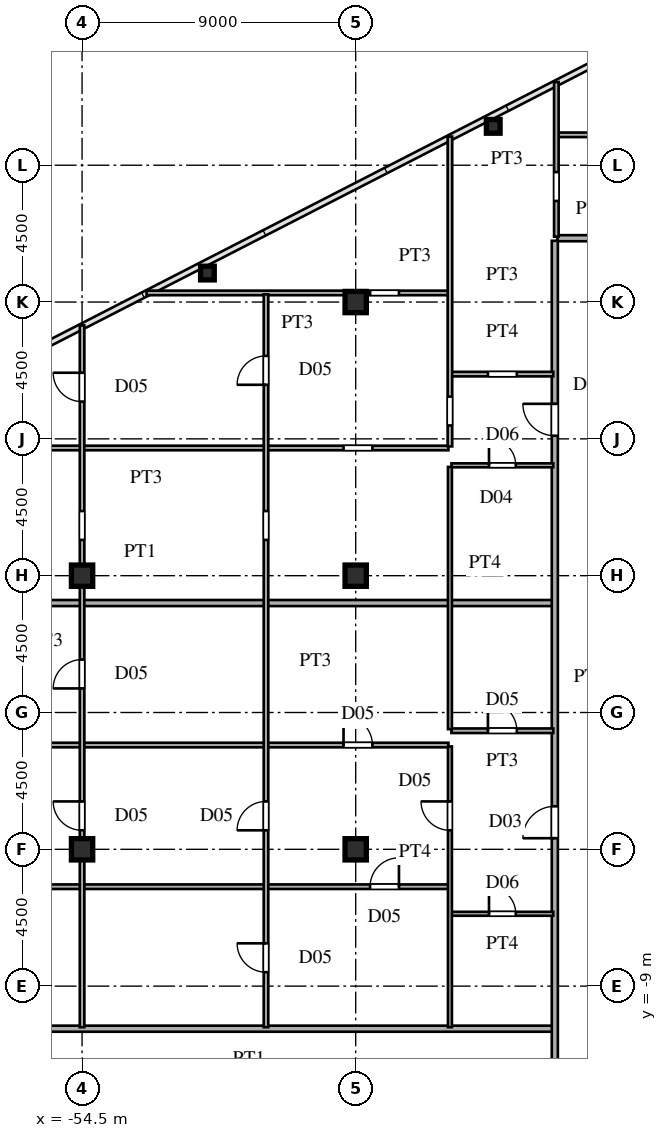
"""IFC4 building model, lengths in metres.
Left out: names, types, materials, properties, quantities, classifications, styles, units other than length and angle.
Written with IfcOpenShell. Run it as: python <this file> out.ifc"""

import sys

from ifc_helpers import new_model, si_unit, direction, frame, frame_2d, origin, origin_2d, place, context, subcontext, project, spatial, rectangle, hollow_rectangle, i_section, extrude, source, transform, mapped, element, fill, save


model = new_model("IFC4")
c1 = context("Model", 3, precision=1e-05, world=origin(), true_north=direction((0.0, 1.0)))
c2 = subcontext(c1, "Body", "Model", "MODEL_VIEW")
j1 = project(units=[si_unit("LENGTHUNIT", "METRE"), si_unit("PLANEANGLEUNIT", "RADIAN")], contexts=[c1])
p1 = place(None, origin())
s1 = spatial("IfcSite", under=j1, at=p1, CompositionType="ELEMENT")
p2 = place(p1, origin())
s2 = spatial("IfcBuilding", under=s1, at=p2, CompositionType="ELEMENT")
p3 = place(p2, frame((0.0, 0.0, 124.8)))
s3 = spatial("IfcBuildingStorey", under=s2, at=p3, CompositionType="ELEMENT", Elevation=124.8)
m1 = source(origin(), c2, "Body", "SweptSolid", [
    extrude(i_section(OverallWidth=0.7, OverallDepth=0.7, WebThickness=0.028, FlangeThickness=0.045, at=origin_2d()), origin(), (0.0, 0.0, 1.0), 3.6),
])
for number, where, z_axis, x_axis in (
    (1, (-45.5, -4.5, 0.0), (0.0, 0.0, 1.0), (1.0, 0.0, 0.0)),
    (2, (-45.5, 4.5, 0.0), (0.0, 0.0, 1.0), (1.0, 0.0, 0.0)),
    (3, (-45.5, 13.5, 0.0), (0.0, 0.0, 1.0), (1.0, 0.0, 0.0)),
    (4, (-54.5, -4.5, 0.0), (0.0, 0.0, 1.0), (1.0, 0.0, 0.0)),
    (5, (-54.5, 4.5, 0.0), (0.0, 0.0, 1.0), (1.0, 0.0, 0.0)),
):
    element("IfcColumn", number, at=place(p3, frame(where, z_axis=z_axis, x_axis=x_axis)), inside=s3, PredefinedType="COLUMN", context=c2, shape_type="MappedRepresentation", body=[
        mapped(m1, transform((0.0, 0.0, 0.0), scale=1.0)),
    ])
m2 = source(origin(), c2, "Body", "SweptSolid", [
    extrude(hollow_rectangle(XDim=0.45, YDim=0.45, WallThickness=0.018, at=origin_2d()), origin(), (0.0, 0.0, 1.0), 3.6),
])
for number, where, z_axis, x_axis in (
    (6, (-40.976, 19.278, 0.0), (0.0, 0.0, 1.0), (1.0, 0.0, 0.0)),
    (7, (-50.377, 14.453, 0.0), (0.0, 0.0, 1.0), (1.0, 0.0, 0.0)),
):
    element("IfcColumn", number, at=place(p3, frame(where, z_axis=z_axis, x_axis=x_axis)), inside=s3, PredefinedType="COLUMN", context=c2, shape_type="MappedRepresentation", body=[
        mapped(m2, transform((0.0, 0.0, 0.0), scale=1.0)),
    ])
p4 = place(p3, frame((-58.988, -10.4, 0.0), z_axis=(0.0, 0.0, 1.0), x_axis=(1.0, 0.0, 0.0)))
e8 = element("IfcWall", 8, at=p4, inside=s3, PredefinedType="PARTITIONING", context=c2, shape_type="SweptSolid", body=[
    extrude(rectangle(XDim=19.958, YDim=0.2, at=frame_2d((9.979, 0.0))), origin(), (0.0, 0.0, 1.0), 3.38),
])
p5 = place(p3, frame((-42.35, -6.62, 0.0), z_axis=(0.0, 0.0, 1.0), x_axis=(1.0, 0.0, 0.0)))
e9 = element("IfcWall", 9, at=p5, inside=s3, PredefinedType="PARTITIONING", context=c2, shape_type="SweptSolid", body=[
    extrude(rectangle(XDim=3.35, YDim=0.13, at=frame_2d((1.675, 0.0))), origin(), (0.0, 0.0, 1.0), 3.38),
])
p6 = place(p5, frame((1.235, 0.0, 0.0)))
e10 = element("IfcOpeningElement", 10, at=p6, cuts=e9, PredefinedType="OPENING", context=c2, shape_type="SweptSolid", body=[
    extrude(rectangle(XDim=0.88, YDim=2.1, at=frame_2d((0.44, 1.05))), frame((0.0, 0.075, 0.0), z_axis=(0.0, -1.0, 0.0), x_axis=(1.0, 0.0, 0.0)), (0.0, 0.0, 1.0), 0.15),
])
p7 = place(p3, frame((-68.106, -5.73, 0.0), z_axis=(0.0, 0.0, 1.0), x_axis=(1.0, 0.0, 0.0)))
e11 = element("IfcWall", 11, at=p7, inside=s3, PredefinedType="PARTITIONING", context=c2, shape_type="SweptSolid", body=[
    extrude(rectangle(XDim=25.656, YDim=0.15, at=frame_2d((12.828, 0.0))), origin(), (0.0, 0.0, 1.0), 3.38),
])
p8 = place(p7, frame((23.079, 0.0, 0.0)))
e12 = element("IfcOpeningElement", 12, at=p8, cuts=e11, PredefinedType="OPENING", context=c2, shape_type="SweptSolid", body=[
    extrude(rectangle(XDim=0.95, YDim=2.15, at=frame_2d((0.475, 1.075))), frame((0.0, 0.085, 0.0), z_axis=(0.0, -1.0, 0.0), x_axis=(1.0, 0.0, 0.0)), (0.0, 0.0, 1.0), 0.17),
])
p9 = place(p7, frame((10.281, 0.0, 0.0)))
e13 = element("IfcOpeningElement", 13, at=p9, cuts=e11, PredefinedType="OPENING", context=c2, shape_type="SweptSolid", body=[
    extrude(rectangle(XDim=0.95, YDim=2.15, at=frame_2d((0.475, 1.075))), frame((0.0, 0.085, 0.0), z_axis=(0.0, -1.0, 0.0), x_axis=(1.0, 0.0, 0.0)), (0.0, 0.0, 1.0), 0.17),
])
p10 = place(p3, frame((-69.535, -1.07, 0.0), z_axis=(0.0, 0.0, 1.0), x_axis=(1.0, 0.0, 0.0)))
e14 = element("IfcWall", 14, at=p10, inside=s3, PredefinedType="PARTITIONING", context=c2, shape_type="SweptSolid", body=[
    extrude(rectangle(XDim=27.085, YDim=0.15, at=frame_2d((13.542, 0.0))), origin(), (0.0, 0.0, 1.0), 3.38),
])
p11 = place(p10, frame((23.635, 0.0, 0.0)))
e15 = element("IfcOpeningElement", 15, at=p11, cuts=e14, PredefinedType="OPENING", context=c2, shape_type="SweptSolid", body=[
    extrude(rectangle(XDim=0.95, YDim=2.15, at=frame_2d((0.475, 1.075))), frame((0.0, 0.085, 0.0), z_axis=(0.0, -1.0, 0.0), x_axis=(1.0, 0.0, 0.0)), (0.0, 0.0, 1.0), 0.17),
])
p12 = place(p10, frame((11.71, 0.0, 0.0)))
e16 = element("IfcOpeningElement", 16, at=p12, cuts=e14, PredefinedType="OPENING", context=c2, shape_type="SweptSolid", body=[
    extrude(rectangle(XDim=0.95, YDim=2.15, at=frame_2d((0.475, 1.075))), frame((0.0, 0.085, 0.0), z_axis=(0.0, -1.0, 0.0), x_axis=(1.0, 0.0, 0.0)), (0.0, 0.0, 1.0), 0.17),
])
p13 = place(p3, frame((-42.35, -0.6, 0.0), z_axis=(0.0, 0.0, 1.0), x_axis=(1.0, 0.0, 0.0)))
e17 = element("IfcWall", 17, at=p13, inside=s3, PredefinedType="PARTITIONING", context=c2, shape_type="SweptSolid", body=[
    extrude(rectangle(XDim=3.35, YDim=0.15, at=frame_2d((1.675, 0.0))), origin(), (0.0, 0.0, 1.0), 3.38),
])
p14 = place(p13, frame((1.2, 0.0, 0.0)))
e18 = element("IfcOpeningElement", 18, at=p14, cuts=e17, PredefinedType="OPENING", context=c2, shape_type="SweptSolid", body=[
    extrude(rectangle(XDim=0.95, YDim=2.15, at=frame_2d((0.475, 1.075))), frame((0.0, 0.085, 0.0), z_axis=(0.0, -1.0, 0.0), x_axis=(1.0, 0.0, 0.0)), (0.0, 0.0, 1.0), 0.17),
])
p15 = place(p3, frame((-69.505, 3.6, 0.0), z_axis=(0.0, 0.0, 1.0), x_axis=(1.0, 0.0, 0.0)))
e19 = element("IfcWall", 19, at=p15, inside=s3, PredefinedType="PARTITIONING", context=c2, shape_type="SweptSolid", body=[
    extrude(rectangle(XDim=30.475, YDim=0.2, at=frame_2d((15.237, 0.0))), origin(), (0.0, 0.0, 1.0), 3.38),
])
p16 = place(p3, frame((-42.35, 8.13, 0.0), z_axis=(0.0, 0.0, 1.0), x_axis=(1.0, 0.0, 0.0)))
e20 = element("IfcWall", 20, at=p16, inside=s3, PredefinedType="PARTITIONING", context=c2, shape_type="SweptSolid", body=[
    extrude(rectangle(XDim=3.35, YDim=0.13, at=frame_2d((1.675, 0.0))), origin(), (0.0, 0.0, 1.0), 3.38),
])
p17 = place(p16, frame((1.235, 0.0, 0.0)))
e21 = element("IfcOpeningElement", 21, at=p17, cuts=e20, PredefinedType="OPENING", context=c2, shape_type="SweptSolid", body=[
    extrude(rectangle(XDim=0.88, YDim=2.1, at=frame_2d((0.44, 1.05))), frame((0.0, 0.075, 0.0), z_axis=(0.0, -1.0, 0.0), x_axis=(1.0, 0.0, 0.0)), (0.0, 0.0, 1.0), 0.15),
])
p18 = place(p3, frame((-62.321, 8.7, 0.0), z_axis=(0.0, 0.0, 1.0), x_axis=(1.0, 0.0, 0.0)))
e22 = element("IfcWall", 22, at=p18, inside=s3, PredefinedType="PARTITIONING", context=c2, shape_type="SweptSolid", body=[
    extrude(rectangle(XDim=19.871, YDim=0.15, at=frame_2d((9.936, 0.0))), origin(), (0.0, 0.0, 1.0), 3.38),
])
p19 = place(p18, frame((16.421, 0.0, 0.0)))
e23 = element("IfcOpeningElement", 23, at=p19, cuts=e22, PredefinedType="OPENING", context=c2, shape_type="SweptSolid", body=[
    extrude(rectangle(XDim=0.95, YDim=2.15, at=frame_2d((0.475, 1.075))), frame((0.0, 0.085, 0.0), z_axis=(0.0, -1.0, 0.0), x_axis=(1.0, 0.0, 0.0)), (0.0, 0.0, 1.0), 0.17),
])
p20 = place(p3, frame((-42.35, 11.13, 0.0), z_axis=(0.0, 0.0, 1.0), x_axis=(1.0, 0.0, 0.0)))
e24 = element("IfcWall", 24, at=p20, inside=s3, PredefinedType="PARTITIONING", context=c2, shape_type="SweptSolid", body=[
    extrude(rectangle(XDim=3.35, YDim=0.15, at=frame_2d((1.675, 0.0))), origin(), (0.0, 0.0, 1.0), 3.38),
])
p21 = place(p20, frame((1.2, 0.0, 0.0)))
e25 = element("IfcOpeningElement", 25, at=p21, cuts=e24, PredefinedType="OPENING", context=c2, shape_type="SweptSolid", body=[
    extrude(rectangle(XDim=0.95, YDim=2.15, at=frame_2d((0.475, 1.075))), frame((0.0, 0.085, 0.0), z_axis=(0.0, -1.0, 0.0), x_axis=(1.0, 0.0, 0.0)), (0.0, 0.0, 1.0), 0.17),
])
p22 = place(p3, frame((-52.378, 13.8, 0.0), z_axis=(0.0, 0.0, 1.0), x_axis=(1.0, 0.0, 0.0)))
e26 = element("IfcWall", 26, at=p22, inside=s3, PredefinedType="PARTITIONING", context=c2, shape_type="SweptSolid", body=[
    extrude(rectangle(XDim=9.928, YDim=0.15, at=frame_2d((4.964, 0.0))), origin(), (0.0, 0.0, 1.0), 2.78),
])
p23 = place(p22, frame((7.351, 0.0, 0.0)))
e27 = element("IfcOpeningElement", 27, at=p23, cuts=e26, PredefinedType="OPENING", context=c2, shape_type="SweptSolid", body=[
    extrude(rectangle(XDim=0.95, YDim=2.15, at=frame_2d((0.475, 1.075))), frame((0.0, 0.085, 0.0), z_axis=(0.0, -1.0, 0.0), x_axis=(1.0, 0.0, 0.0)), (0.0, 0.0, 1.0), 0.17),
])
p24 = place(p3, frame((-38.865, 15.6, 0.0), z_axis=(0.0, 0.0, 1.0), x_axis=(1.0, 0.0, 0.0)))
e28 = element("IfcWall", 28, at=p24, inside=s3, PredefinedType="PARTITIONING", context=c2, shape_type="SweptSolid", body=[
    extrude(rectangle(XDim=2.28, YDim=0.2, at=frame_2d((1.14, 0.0))), origin(), (0.0, 0.0, 1.0), 3.38),
])
p25 = place(p3, frame((-38.85, 19.0, 0.0), z_axis=(0.0, 0.0, 1.0), x_axis=(1.0, 0.0, 0.0)))
e29 = element("IfcWall", 29, at=p25, inside=s3, PredefinedType="PARTITIONING", context=c2, shape_type="SweptSolid", body=[
    extrude(rectangle(XDim=11.385, YDim=0.15, at=frame_2d((5.692, 0.0))), origin(), (0.0, 0.0, 1.0), 3.38),
])
p26 = place(p25, frame((5.175, 0.0, 0.0)))
e30 = element("IfcOpeningElement", 30, at=p26, cuts=e29, PredefinedType="OPENING", context=c2, shape_type="SweptSolid", body=[
    extrude(rectangle(XDim=0.95, YDim=2.15, at=frame_2d((0.475, 1.075))), frame((0.0, 0.085, 0.0), z_axis=(0.0, -1.0, 0.0), x_axis=(1.0, 0.0, 0.0)), (0.0, 0.0, 1.0), 0.17),
])
p27 = place(p3, frame((-54.5, -10.35, 0.0), z_axis=(0.0, 0.0, 1.0), x_axis=(0.0, 1.0, 0.0)))
e31 = element("IfcWall", 31, at=p27, inside=s3, PredefinedType="PARTITIONING", context=c2, shape_type="SweptSolid", body=[
    extrude(rectangle(XDim=23.082, YDim=0.15, at=frame_2d((11.541, 0.0))), origin(), (0.0, 0.0, 1.0), 2.78),
])
p28 = place(p27, frame((6.475, 0.0, 0.0)))
e32 = element("IfcOpeningElement", 32, at=p28, cuts=e31, PredefinedType="OPENING", context=c2, shape_type="SweptSolid", body=[
    extrude(rectangle(XDim=0.95, YDim=2.15, at=frame_2d((0.475, 1.075))), frame((0.0, 0.085, 0.0), z_axis=(0.0, -1.0, 0.0), x_axis=(1.0, 0.0, 0.0)), (0.0, 0.0, 1.0), 0.17),
])
p29 = place(p27, frame((11.142, 0.0, 0.0)))
e33 = element("IfcOpeningElement", 33, at=p29, cuts=e31, PredefinedType="OPENING", context=c2, shape_type="SweptSolid", body=[
    extrude(rectangle(XDim=0.95, YDim=2.15, at=frame_2d((0.475, 1.075))), frame((0.0, 0.085, 0.0), z_axis=(0.0, -1.0, 0.0), x_axis=(1.0, 0.0, 0.0)), (0.0, 0.0, 1.0), 0.17),
])
p30 = place(p27, frame((20.575, 0.0, 0.0)))
e34 = element("IfcOpeningElement", 34, at=p30, cuts=e31, PredefinedType="OPENING", context=c2, shape_type="SweptSolid", body=[
    extrude(rectangle(XDim=0.95, YDim=2.15, at=frame_2d((0.475, 1.075))), frame((0.0, 0.085, 0.0), z_axis=(0.0, -1.0, 0.0), x_axis=(1.0, 0.0, 0.0)), (0.0, 0.0, 1.0), 0.17),
])
p31 = place(p27, frame((16.026, 0.0, 0.0)))
e35 = element("IfcOpeningElement", 35, at=p31, cuts=e31, PredefinedType="OPENING", context=c2, shape_type="SweptSolid", body=[
    extrude(rectangle(XDim=0.95, YDim=2.15, at=frame_2d((0.475, 1.075))), frame((0.0, 0.085, 0.0), z_axis=(0.0, -1.0, 0.0), x_axis=(1.0, 0.0, 0.0)), (0.0, 0.0, 1.0), 0.17),
])
p32 = place(p3, frame((-48.45, -10.35, 0.0), z_axis=(0.0, 0.0, 1.0), x_axis=(0.0, 1.0, 0.0)))
e36 = element("IfcWall", 36, at=p32, inside=s3, PredefinedType="PARTITIONING", context=c2, shape_type="SweptSolid", body=[
    extrude(rectangle(XDim=24.104, YDim=0.15, at=frame_2d((12.052, 0.0))), origin(), (0.0, 0.0, 1.0), 3.38),
])
p33 = place(p32, frame((6.475, 0.0, 0.0)))
e37 = element("IfcOpeningElement", 37, at=p33, cuts=e36, PredefinedType="OPENING", context=c2, shape_type="SweptSolid", body=[
    extrude(rectangle(XDim=0.95, YDim=2.15, at=frame_2d((0.475, 1.075))), frame((0.0, 0.085, 0.0), z_axis=(0.0, -1.0, 0.0), x_axis=(1.0, 0.0, 0.0)), (0.0, 0.0, 1.0), 0.17),
])
p34 = place(p32, frame((1.808, 0.0, 0.0)))
e38 = element("IfcOpeningElement", 38, at=p34, cuts=e36, PredefinedType="OPENING", context=c2, shape_type="SweptSolid", body=[
    extrude(rectangle(XDim=0.95, YDim=2.15, at=frame_2d((0.475, 1.075))), frame((0.0, 0.085, 0.0), z_axis=(0.0, -1.0, 0.0), x_axis=(1.0, 0.0, 0.0)), (0.0, 0.0, 1.0), 0.17),
])
p35 = place(p32, frame((21.128, 0.0, 0.0)))
e39 = element("IfcOpeningElement", 39, at=p35, cuts=e36, PredefinedType="OPENING", context=c2, shape_type="SweptSolid", body=[
    extrude(rectangle(XDim=0.95, YDim=2.15, at=frame_2d((0.475, 1.075))), frame((0.0, 0.085, 0.0), z_axis=(0.0, -1.0, 0.0), x_axis=(1.0, 0.0, 0.0)), (0.0, 0.0, 1.0), 0.17),
])
p36 = place(p32, frame((16.026, 0.0, 0.0)))
e40 = element("IfcOpeningElement", 40, at=p36, cuts=e36, PredefinedType="OPENING", context=c2, shape_type="SweptSolid", body=[
    extrude(rectangle(XDim=0.95, YDim=2.15, at=frame_2d((0.475, 1.075))), frame((0.0, 0.085, 0.0), z_axis=(0.0, -1.0, 0.0), x_axis=(1.0, 0.0, 0.0)), (0.0, 0.0, 1.0), 0.17),
])
p37 = place(p3, frame((-42.4, -10.35, 0.0), z_axis=(0.0, 0.0, 1.0), x_axis=(0.0, 1.0, 0.0)))
e41 = element("IfcWall", 41, at=p37, inside=s3, PredefinedType="PARTITIONING", context=c2, shape_type="SweptSolid", body=[
    extrude(rectangle(XDim=9.233, YDim=0.13, at=frame_2d((4.617, 0.0))), origin(), (0.0, 0.0, 1.0), 3.38),
])
p38 = place(p37, frame((6.475, 0.0, 0.0)))
e42 = element("IfcOpeningElement", 42, at=p38, cuts=e41, PredefinedType="OPENING", context=c2, shape_type="SweptSolid", body=[
    extrude(rectangle(XDim=0.95, YDim=2.15, at=frame_2d((0.475, 1.075))), frame((0.0, 0.075, 0.0), z_axis=(0.0, -1.0, 0.0), x_axis=(1.0, 0.0, 0.0)), (0.0, 0.0, 1.0), 0.15),
])
p39 = place(p3, frame((-42.4, -0.548, 0.0), z_axis=(0.0, 0.0, 1.0), x_axis=(0.0, 1.0, 0.0)))
e43 = element("IfcWall", 43, at=p39, inside=s3, PredefinedType="PARTITIONING", context=c2, shape_type="SweptSolid", body=[
    extrude(rectangle(XDim=8.625, YDim=0.13, at=frame_2d((4.312, 0.0))), origin(), (0.0, 0.0, 1.0), 3.38),
])
p40 = place(p3, frame((-42.4, 8.752, 0.0), z_axis=(0.0, 0.0, 1.0), x_axis=(0.0, 1.0, 0.0)))
e44 = element("IfcWall", 44, at=p40, inside=s3, PredefinedType="PARTITIONING", context=c2, shape_type="SweptSolid", body=[
    extrude(rectangle(XDim=10.19, YDim=0.15, at=frame_2d((5.095, 0.0))), origin(), (0.0, 0.0, 1.0), 3.38),
])
p41 = place(p40, frame((0.688, 0.0, 0.0)))
e45 = element("IfcOpeningElement", 45, at=p41, cuts=e44, PredefinedType="OPENING", context=c2, shape_type="SweptSolid", body=[
    extrude(rectangle(XDim=0.95, YDim=2.15, at=frame_2d((0.475, 1.075))), frame((0.0, 0.085, 0.0), z_axis=(0.0, -1.0, 0.0), x_axis=(1.0, 0.0, 0.0)), (0.0, 0.0, 1.0), 0.17),
])
p42 = place(p3, frame((-38.95, -15.515, 0.0), z_axis=(0.0, 0.0, 1.0), x_axis=(0.0, 1.0, 0.0)))
e46 = element("IfcWall", 46, at=p42, inside=s3, PredefinedType="PARTITIONING", context=c2, shape_type="SweptSolid", body=[
    extrude(rectangle(XDim=31.03, YDim=0.2, at=frame_2d((15.515, 0.0))), origin(), (0.0, 0.0, 1.0), 3.38),
])
p43 = place(p42, frame((1.99, 0.0, 0.0)))
e47 = element("IfcOpeningElement", 47, at=p43, cuts=e46, PredefinedType="OPENING", context=c2, shape_type="SweptSolid", body=[
    extrude(rectangle(XDim=1.05, YDim=2.25, at=frame_2d((0.525, 1.125))), frame((0.0, 0.11, 0.0), z_axis=(0.0, -1.0, 0.0), x_axis=(1.0, 0.0, 0.0)), (0.0, 0.0, 1.0), 0.22),
])
p44 = place(p42, frame((11.38, 0.0, 0.0)))
e48 = element("IfcOpeningElement", 48, at=p44, cuts=e46, PredefinedType="OPENING", context=c2, shape_type="SweptSolid", body=[
    extrude(rectangle(XDim=1.05, YDim=2.25, at=frame_2d((0.525, 1.125))), frame((0.0, 0.11, 0.0), z_axis=(0.0, -1.0, 0.0), x_axis=(1.0, 0.0, 0.0)), (0.0, 0.0, 1.0), 0.22),
])
p45 = place(p42, frame((24.617, 0.0, 0.0)))
e49 = element("IfcOpeningElement", 49, at=p45, cuts=e46, PredefinedType="OPENING", context=c2, shape_type="SweptSolid", body=[
    extrude(rectangle(XDim=1.05, YDim=2.25, at=frame_2d((0.525, 1.125))), frame((0.0, 0.11, 0.0), z_axis=(0.0, -1.0, 0.0), x_axis=(1.0, 0.0, 0.0)), (0.0, 0.0, 1.0), 0.22),
])
p46 = place(p3, frame((-38.9, 15.65, 0.0), z_axis=(0.0, 0.0, 1.0), x_axis=(0.0, 1.0, 0.0)))
e50 = element("IfcWall", 50, at=p46, inside=s3, PredefinedType="PARTITIONING", context=c2, shape_type="SweptSolid", body=[
    extrude(rectangle(XDim=5.088, YDim=0.15, at=frame_2d((2.544, 0.0))), origin(), (0.0, 0.0, 1.0), 3.38),
])
p47 = place(p46, frame((1.175, 0.0, 0.0)))
e51 = element("IfcOpeningElement", 51, at=p47, cuts=e50, PredefinedType="OPENING", context=c2, shape_type="SweptSolid", body=[
    extrude(rectangle(XDim=0.95, YDim=2.15, at=frame_2d((0.475, 1.075))), frame((0.0, 0.085, 0.0), z_axis=(0.0, -1.0, 0.0), x_axis=(1.0, 0.0, 0.0)), (0.0, 0.0, 1.0), 0.17),
])
m3 = source(origin(), c2, "Body", "SweptSolid", [
    extrude(rectangle(XDim=0.88, YDim=2.1, at=frame_2d((0.44, 1.05))), frame((0.0, 0.025, 0.0), z_axis=(0.0, -1.0, 0.0), x_axis=(1.0, 0.0, 0.0)), (0.0, 0.0, 1.0), 0.05),
])
p48 = place(p6, origin())
e52 = element("IfcDoor", 52, at=p48, inside=s3, OperationType="SINGLE_SWING_LEFT", PredefinedType="DOOR", context=c2, shape_type="MappedRepresentation", body=[
    mapped(m3, transform((0.0, 0.0, 0.0), scale=1.0)),
])
fill(e10, e52)
m4 = source(origin(), c2, "Body", "SweptSolid", [
    extrude(rectangle(XDim=0.95, YDim=2.15, at=frame_2d((0.475, 1.075))), frame((0.0, 0.025, 0.0), z_axis=(0.0, -1.0, 0.0), x_axis=(1.0, 0.0, 0.0)), (0.0, 0.0, 1.0), 0.05),
])
p49 = place(p8, origin())
e53 = element("IfcDoor", 53, at=p49, inside=s3, OperationType="SINGLE_SWING_RIGHT", PredefinedType="DOOR", context=c2, shape_type="MappedRepresentation", body=[
    mapped(m4, transform((0.0, 0.0, 0.0), scale=1.0)),
])
fill(e12, e53)
p50 = place(p11, origin())
e54 = element("IfcDoor", 54, at=p50, inside=s3, OperationType="SINGLE_SWING_LEFT", PredefinedType="DOOR", context=c2, shape_type="MappedRepresentation", body=[
    mapped(m4, transform((0.0, 0.0, 0.0), scale=1.0)),
])
fill(e15, e54)
p51 = place(p14, origin())
e55 = element("IfcDoor", 55, at=p51, inside=s3, OperationType="SINGLE_SWING_LEFT", PredefinedType="DOOR", context=c2, shape_type="MappedRepresentation", body=[
    mapped(m4, transform((0.0, 0.0, 0.0), scale=1.0)),
])
fill(e18, e55)
p52 = place(p17, origin())
e56 = element("IfcDoor", 56, at=p52, inside=s3, OperationType="SINGLE_SWING_LEFT", PredefinedType="DOOR", context=c2, shape_type="MappedRepresentation", body=[
    mapped(m3, transform((0.0, 0.0, 0.0), scale=1.0)),
])
fill(e21, e56)
p53 = place(p28, origin())
e57 = element("IfcDoor", 57, at=p53, inside=s3, OperationType="SINGLE_SWING_RIGHT", PredefinedType="DOOR", context=c2, shape_type="MappedRepresentation", body=[
    mapped(m4, transform((0.0, 0.0, 0.0), scale=1.0)),
])
fill(e32, e57)
p54 = place(p29, origin())
e58 = element("IfcDoor", 58, at=p54, inside=s3, OperationType="SINGLE_SWING_LEFT", PredefinedType="DOOR", context=c2, shape_type="MappedRepresentation", body=[
    mapped(m4, transform((0.0, 0.0, 0.0), scale=1.0)),
])
fill(e33, e58)
p55 = place(p30, origin())
e59 = element("IfcDoor", 59, at=p55, inside=s3, OperationType="SINGLE_SWING_RIGHT", PredefinedType="DOOR", context=c2, shape_type="MappedRepresentation", body=[
    mapped(m4, transform((0.0, 0.0, 0.0), scale=1.0)),
])
fill(e34, e59)
p56 = place(p33, origin())
e60 = element("IfcDoor", 60, at=p56, inside=s3, OperationType="SINGLE_SWING_LEFT", PredefinedType="DOOR", context=c2, shape_type="MappedRepresentation", body=[
    mapped(m4, transform((0.0, 0.0, 0.0), scale=1.0)),
])
fill(e37, e60)
p57 = place(p34, origin())
e61 = element("IfcDoor", 61, at=p57, inside=s3, OperationType="SINGLE_SWING_RIGHT", PredefinedType="DOOR", context=c2, shape_type="MappedRepresentation", body=[
    mapped(m4, transform((0.0, 0.0, 0.0), scale=1.0)),
])
fill(e38, e61)
p58 = place(p35, origin())
e62 = element("IfcDoor", 62, at=p58, inside=s3, OperationType="SINGLE_SWING_LEFT", PredefinedType="DOOR", context=c2, shape_type="MappedRepresentation", body=[
    mapped(m4, transform((0.0, 0.0, 0.0), scale=1.0)),
])
fill(e39, e62)
p59 = place(p38, origin())
e63 = element("IfcDoor", 63, at=p59, inside=s3, OperationType="SINGLE_SWING_RIGHT", PredefinedType="DOOR", context=c2, shape_type="MappedRepresentation", body=[
    mapped(m4, transform((0.0, 0.0, 0.0), scale=1.0)),
])
fill(e42, e63)
m5 = source(origin(), c2, "Body", "SweptSolid", [
    extrude(rectangle(XDim=1.05, YDim=2.25, at=frame_2d((0.525, 1.125))), frame((0.0, 0.025, 0.0), z_axis=(0.0, -1.0, 0.0), x_axis=(1.0, 0.0, 0.0)), (0.0, 0.0, 1.0), 0.05),
])
p60 = place(p44, origin())
e64 = element("IfcDoor", 64, at=p60, inside=s3, OperationType="SINGLE_SWING_LEFT", PredefinedType="DOOR", context=c2, shape_type="MappedRepresentation", body=[
    mapped(m5, transform((0.0, 0.0, 0.0), scale=1.0)),
])
fill(e48, e64)
p61 = place(p45, origin())
e65 = element("IfcDoor", 65, at=p61, inside=s3, OperationType="SINGLE_SWING_RIGHT", PredefinedType="DOOR", context=c2, shape_type="MappedRepresentation", body=[
    mapped(m5, transform((0.0, 0.0, 0.0), scale=1.0)),
])
fill(e49, e65)
save(model, sys.argv[1])
